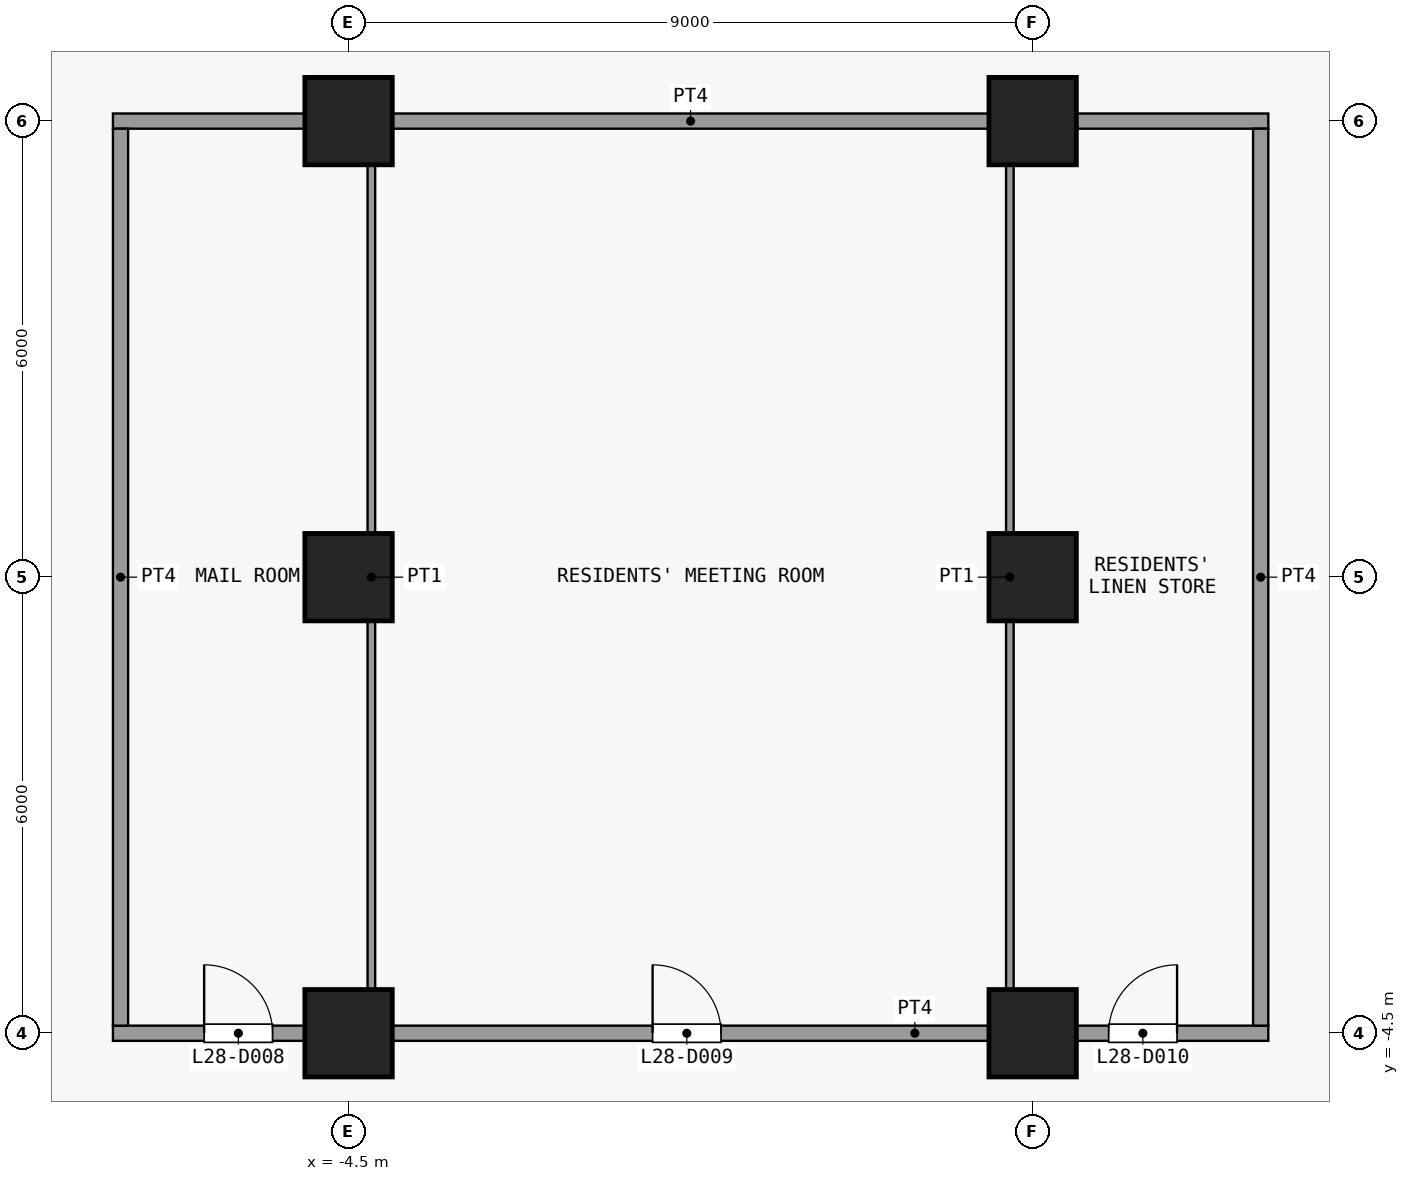
"""IFC4 building model, lengths in metres.
Left out: names, types, materials, properties, quantities, classifications, styles, units other than length and angle.
Written with IfcOpenShell. Run it as: python <this file> out.ifc"""

import sys

from ifc_helpers import new_model, si_unit, direction, frame, frame_2d, origin, origin_2d, place, context, subcontext, project, spatial, rectangle, extrude, element, fill, save


model = new_model("IFC4")
c1 = context("Model", 3, precision=1e-05, world=origin(), true_north=direction((0.0, 1.0)))
c2 = subcontext(c1, "Body", "Model", "MODEL_VIEW")
j1 = project(units=[si_unit("LENGTHUNIT", "METRE"), si_unit("PLANEANGLEUNIT", "RADIAN")], contexts=[c1])
p1 = place(None, origin())
s1 = spatial("IfcSite", under=j1, at=p1, CompositionType="ELEMENT")
p2 = place(p1, origin())
s2 = spatial("IfcBuilding", under=s1, at=p2, CompositionType="ELEMENT")
p3 = place(p2, frame((0.0, 0.0, 113.5)))
s3 = spatial("IfcBuildingStorey", under=s2, at=p3, CompositionType="ELEMENT", Elevation=113.5)
for number, where, z_axis, x_axis in (
    (1, (-4.5, -4.5, 0.0), (0.0, 0.0, 1.0), (1.0, 0.0, 0.0)),
    (2, (-4.5, 1.5, 0.0), (0.0, 0.0, 1.0), (1.0, 0.0, 0.0)),
    (3, (-4.5, 7.5, 0.0), (0.0, 0.0, 1.0), (1.0, 0.0, 0.0)),
    (4, (4.5, -4.5, 0.0), (0.0, 0.0, 1.0), (1.0, 0.0, 0.0)),
    (5, (4.5, 1.5, 0.0), (0.0, 0.0, 1.0), (1.0, 0.0, 0.0)),
    (6, (4.5, 7.5, 0.0), (0.0, 0.0, 1.0), (1.0, 0.0, 0.0)),
):
    element("IfcColumn", number, at=place(p3, frame(where, z_axis=z_axis, x_axis=x_axis)), inside=s3, PredefinedType="COLUMN", context=c2, shape_type="SweptSolid", body=[
        extrude(rectangle(XDim=1.15, YDim=1.15, at=origin_2d()), origin(), (0.0, 0.0, 1.0), 3.6),
    ])
p4 = place(p3, frame((-7.6, -4.5, 0.0), z_axis=(0.0, 0.0, 1.0), x_axis=(1.0, 0.0, 0.0)))
e7 = element("IfcWall", 7, at=p4, inside=s3, PredefinedType="PARTITIONING", context=c2, shape_type="SweptSolid", body=[
    extrude(rectangle(XDim=15.2, YDim=0.2, at=frame_2d((7.6, 0.0))), origin(), (0.0, 0.0, 1.0), 3.3),
])
p5 = place(p4, frame((1.2, 0.0, 0.0)))
e8 = element("IfcOpeningElement", 8, at=p5, cuts=e7, PredefinedType="OPENING", context=c2, shape_type="SweptSolid", body=[
    extrude(rectangle(XDim=0.9, YDim=2.1, at=frame_2d((0.45, 1.05))), frame((0.0, 0.11, 0.0), z_axis=(0.0, -1.0, 0.0), x_axis=(1.0, 0.0, 0.0)), (0.0, 0.0, 1.0), 0.22),
])
p6 = place(p4, frame((7.1, 0.0, 0.0)))
e9 = element("IfcOpeningElement", 9, at=p6, cuts=e7, PredefinedType="OPENING", context=c2, shape_type="SweptSolid", body=[
    extrude(rectangle(XDim=0.9, YDim=2.1, at=frame_2d((0.45, 1.05))), frame((0.0, 0.11, 0.0), z_axis=(0.0, -1.0, 0.0), x_axis=(1.0, 0.0, 0.0)), (0.0, 0.0, 1.0), 0.22),
])
p7 = place(p4, frame((13.1, 0.0, 0.0)))
e10 = element("IfcOpeningElement", 10, at=p7, cuts=e7, PredefinedType="OPENING", context=c2, shape_type="SweptSolid", body=[
    extrude(rectangle(XDim=0.9, YDim=2.1, at=frame_2d((0.45, 1.05))), frame((0.0, 0.11, 0.0), z_axis=(0.0, -1.0, 0.0), x_axis=(1.0, 0.0, 0.0)), (0.0, 0.0, 1.0), 0.22),
])
p8 = place(p3, frame((-7.6, 7.5, 0.0), z_axis=(0.0, 0.0, 1.0), x_axis=(1.0, 0.0, 0.0)))
e11 = element("IfcWall", 11, at=p8, inside=s3, PredefinedType="PARTITIONING", context=c2, shape_type="SweptSolid", body=[
    extrude(rectangle(XDim=15.2, YDim=0.2, at=frame_2d((7.6, 0.0))), origin(), (0.0, 0.0, 1.0), 3.3),
])
p9 = place(p3, frame((-7.5, -4.4, 0.0), z_axis=(0.0, 0.0, 1.0), x_axis=(0.0, 1.0, 0.0)))
e12 = element("IfcWall", 12, at=p9, inside=s3, PredefinedType="PARTITIONING", context=c2, shape_type="SweptSolid", body=[
    extrude(rectangle(XDim=11.8, YDim=0.2, at=frame_2d((5.9, 0.0))), origin(), (0.0, 0.0, 1.0), 3.3),
])
for number, where, z_axis, x_axis in (
    (13, (-4.2, -4.4, 0.0), (0.0, 0.0, 1.0), (0.0, 1.0, 0.0)),
    (14, (4.2, -4.4, 0.0), (0.0, 0.0, 1.0), (0.0, 1.0, 0.0)),
):
    element("IfcWall", number, at=place(p3, frame(where, z_axis=z_axis, x_axis=x_axis)), inside=s3, PredefinedType="PARTITIONING", context=c2, shape_type="SweptSolid", body=[
        extrude(rectangle(XDim=11.8, YDim=0.1, at=frame_2d((5.9, 0.0))), origin(), (0.0, 0.0, 1.0), 3.3),
    ])
p10 = place(p3, frame((7.5, -4.4, 0.0), z_axis=(0.0, 0.0, 1.0), x_axis=(0.0, 1.0, 0.0)))
e15 = element("IfcWall", 15, at=p10, inside=s3, PredefinedType="PARTITIONING", context=c2, shape_type="SweptSolid", body=[
    extrude(rectangle(XDim=11.8, YDim=0.2, at=frame_2d((5.9, 0.0))), origin(), (0.0, 0.0, 1.0), 3.3),
])
p11 = place(p5, origin())
e16 = element("IfcDoor", 16, at=p11, inside=s3, OperationType="SINGLE_SWING_RIGHT", PredefinedType="DOOR", context=c2, shape_type="SweptSolid", body=[
    extrude(rectangle(XDim=0.9, YDim=2.1, at=frame_2d((0.45, 1.05))), frame((0.0, 0.025, 0.0), z_axis=(0.0, -1.0, 0.0), x_axis=(1.0, 0.0, 0.0)), (0.0, 0.0, 1.0), 0.05),
])
fill(e8, e16)
p12 = place(p6, origin())
e17 = element("IfcDoor", 17, at=p12, inside=s3, OperationType="SINGLE_SWING_RIGHT", PredefinedType="DOOR", context=c2, shape_type="SweptSolid", body=[
    extrude(rectangle(XDim=0.9, YDim=2.1, at=frame_2d((0.45, 1.05))), frame((0.0, 0.025, 0.0), z_axis=(0.0, -1.0, 0.0), x_axis=(1.0, 0.0, 0.0)), (0.0, 0.0, 1.0), 0.05),
])
fill(e9, e17)
p13 = place(p7, origin())
e18 = element("IfcDoor", 18, at=p13, inside=s3, OperationType="SINGLE_SWING_LEFT", PredefinedType="DOOR", context=c2, shape_type="SweptSolid", body=[
    extrude(rectangle(XDim=0.9, YDim=2.1, at=frame_2d((0.45, 1.05))), frame((0.0, 0.025, 0.0), z_axis=(0.0, -1.0, 0.0), x_axis=(1.0, 0.0, 0.0)), (0.0, 0.0, 1.0), 0.05),
])
fill(e10, e18)
save(model, sys.argv[1])
